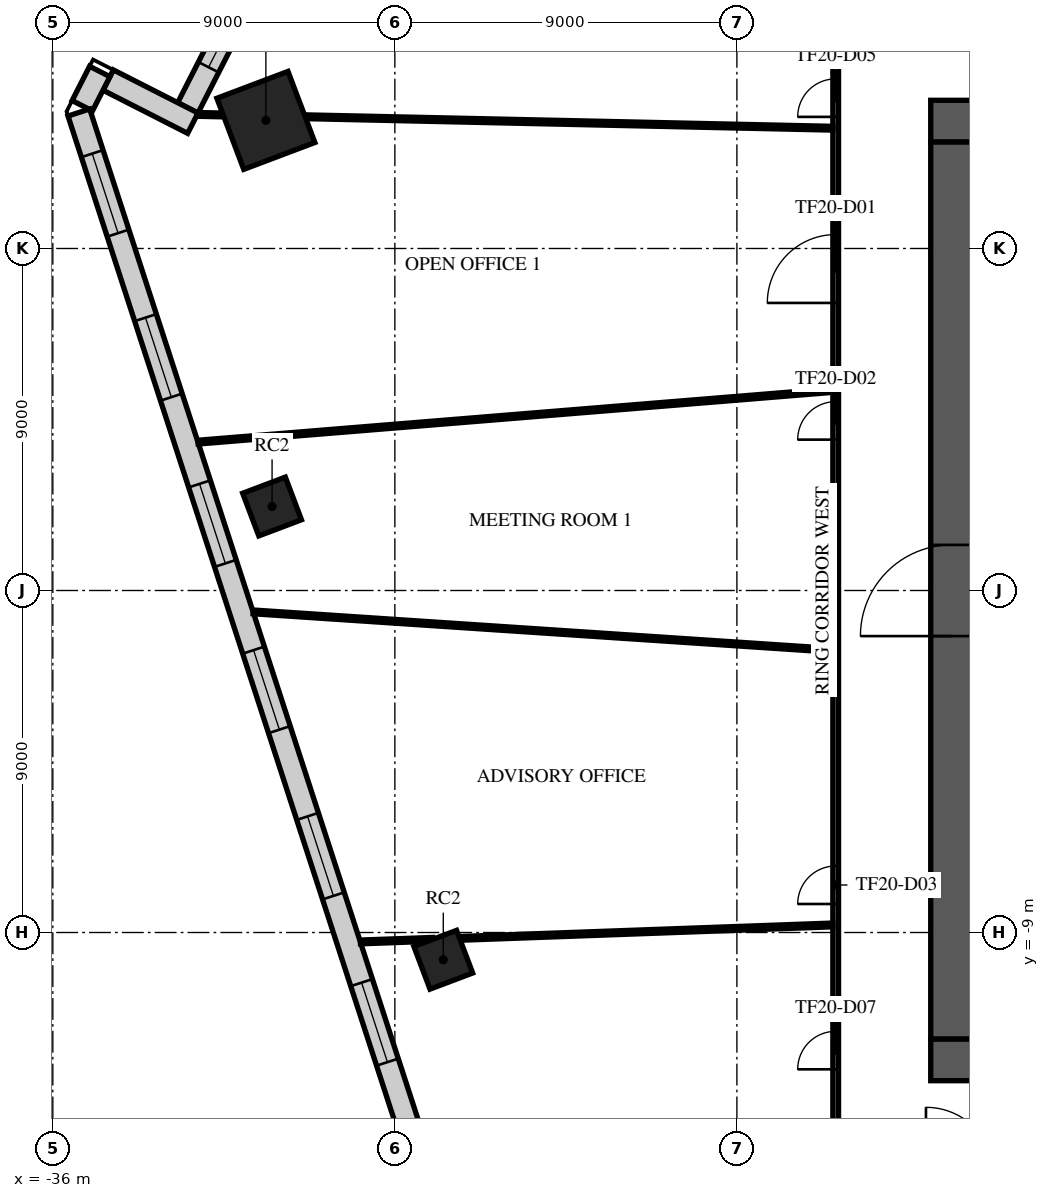
"""IFC4 building model, lengths in metres.
Left out: names, types, materials, properties, quantities, classifications, styles, units other than length and angle.
Written with IfcOpenShell. Run it as: python <this file> out.ifc"""

import sys

from ifc_helpers import new_model, si_unit, direction, frame, frame_2d, origin, origin_2d, place, context, subcontext, project, spatial, rectangle, extrude, element, fill, save


model = new_model("IFC4")
c1 = context("Model", 3, precision=1e-05, world=origin(), true_north=direction((0.0, 1.0)))
c2 = subcontext(c1, "Body", "Model", "MODEL_VIEW")
j1 = project(units=[si_unit("LENGTHUNIT", "METRE"), si_unit("PLANEANGLEUNIT", "RADIAN")], contexts=[c1])
p1 = place(None, origin())
s1 = spatial("IfcSite", under=j1, at=p1, CompositionType="ELEMENT")
p2 = place(p1, origin())
s2 = spatial("IfcBuilding", under=s1, at=p2, CompositionType="ELEMENT")
p3 = place(p2, frame((0.0, 0.0, 90.1)))
s3 = spatial("IfcBuildingStorey", under=s2, at=p3, CompositionType="ELEMENT", Elevation=90.1)
p4 = place(p3, frame((-30.394, 12.371, 0.0), z_axis=(0.0, 0.0, 1.0), x_axis=(0.935491525991, 0.353349125935, 0.0)))
e1 = element("IfcColumn", 1, at=p4, inside=s3, PredefinedType="COLUMN", context=c2, shape_type="SweptSolid", body=[
    extrude(rectangle(XDim=2.0, YDim=2.0, at=origin_2d()), origin(), (0.0, 0.0, 1.0), 4.0),
])
for number, where, z_axis, x_axis in (
    (2, (-30.231, 2.21, 0.0), (0.0, 0.0, 1.0), (0.935, 0.353, 0.0)),
    (3, (-25.726, -9.717, 0.0), (0.0, 0.0, 1.0), (0.935, 0.353, 0.0)),
):
    element("IfcColumn", number, at=place(p3, frame(where, z_axis=z_axis, x_axis=x_axis)), inside=s3, PredefinedType="COLUMN", context=c2, shape_type="SweptSolid", body=[
        extrude(rectangle(XDim=1.2, YDim=1.2, at=origin_2d()), origin(), (0.0, 0.0, 1.0), 4.0),
    ])
p5 = place(p3, frame((-12.9, 12.35, 0.0), z_axis=(0.0, 0.0, 1.0), x_axis=(1.0, 0.0, 0.0)))
e4 = element("IfcWall", 4, at=p5, inside=s3, PredefinedType="SHEAR", context=c2, shape_type="SweptSolid", body=[
    extrude(rectangle(XDim=25.8, YDim=1.1, at=frame_2d((12.9, 0.0))), origin(), (0.0, 0.0, 1.0), 3.58),
])
p6 = place(p5, frame((11.7, 0.0, 0.0)))
e5 = element("IfcOpeningElement", 5, at=p6, cuts=e4, PredefinedType="OPENING", context=c2, shape_type="SweptSolid", body=[
    extrude(rectangle(XDim=2.4, YDim=2.4, at=frame_2d((1.2, 1.2))), frame((0.0, 0.56, 0.0), z_axis=(0.0, -1.0, 0.0), x_axis=(1.0, 0.0, 0.0)), (0.0, 0.0, 1.0), 1.12),
])
p7 = place(p5, frame((22.525, 0.0, 0.0)))
e6 = element("IfcOpeningElement", 6, at=p7, cuts=e4, PredefinedType="OPENING", context=c2, shape_type="SweptSolid", body=[
    extrude(rectangle(XDim=1.2, YDim=2.1, at=frame_2d((0.6, 1.05))), frame((0.0, 0.56, 0.0), z_axis=(0.0, -1.0, 0.0), x_axis=(1.0, 0.0, 0.0)), (0.0, 0.0, 1.0), 1.12),
])
p8 = place(p5, frame((1.5, 0.0, 0.0)))
e7 = element("IfcOpeningElement", 7, at=p8, cuts=e4, PredefinedType="OPENING", context=c2, shape_type="SweptSolid", body=[
    extrude(rectangle(XDim=1.0, YDim=2.1, at=frame_2d((0.5, 1.05))), frame((0.0, 0.56, 0.0), z_axis=(0.0, -1.0, 0.0), x_axis=(1.0, 0.0, 0.0)), (0.0, 0.0, 1.0), 1.12),
])
p9 = place(p3, frame((-12.9, -12.35, 0.0), z_axis=(0.0, 0.0, 1.0), x_axis=(1.0, 0.0, 0.0)))
e8 = element("IfcWall", 8, at=p9, inside=s3, PredefinedType="SHEAR", context=c2, shape_type="SweptSolid", body=[
    extrude(rectangle(XDim=25.8, YDim=1.1, at=frame_2d((12.9, 0.0))), origin(), (0.0, 0.0, 1.0), 3.58),
])
p10 = place(p9, frame((7.8, 0.0, 0.0)))
e9 = element("IfcOpeningElement", 9, at=p10, cuts=e8, PredefinedType="OPENING", context=c2, shape_type="SweptSolid", body=[
    extrude(rectangle(XDim=2.0, YDim=2.1, at=frame_2d((1.0, 1.05))), frame((0.0, 0.56, 0.0), z_axis=(0.0, -1.0, 0.0), x_axis=(1.0, 0.0, 0.0)), (0.0, 0.0, 1.0), 1.12),
])
p11 = place(p9, frame((17.925, 0.0, 0.0)))
e10 = element("IfcOpeningElement", 10, at=p11, cuts=e8, PredefinedType="OPENING", context=c2, shape_type="SweptSolid", body=[
    extrude(rectangle(XDim=1.2, YDim=2.1, at=frame_2d((0.6, 1.05))), frame((0.0, 0.56, 0.0), z_axis=(0.0, -1.0, 0.0), x_axis=(1.0, 0.0, 0.0)), (0.0, 0.0, 1.0), 1.12),
])
p12 = place(p9, frame((2.075, 0.0, 0.0)))
e11 = element("IfcOpeningElement", 11, at=p12, cuts=e8, PredefinedType="OPENING", context=c2, shape_type="SweptSolid", body=[
    extrude(rectangle(XDim=1.2, YDim=2.1, at=frame_2d((0.6, 1.05))), frame((0.0, 0.56, 0.0), z_axis=(0.0, -1.0, 0.0), x_axis=(1.0, 0.0, 0.0)), (0.0, 0.0, 1.0), 1.12),
])
p13 = place(p9, frame((22.525, 0.0, 0.0)))
e12 = element("IfcOpeningElement", 12, at=p13, cuts=e8, PredefinedType="OPENING", context=c2, shape_type="SweptSolid", body=[
    extrude(rectangle(XDim=1.2, YDim=2.1, at=frame_2d((0.6, 1.05))), frame((0.0, 0.56, 0.0), z_axis=(0.0, -1.0, 0.0), x_axis=(1.0, 0.0, 0.0)), (0.0, 0.0, 1.0), 1.12),
])
p14 = place(p3, frame((-12.35, -11.8, 0.0), z_axis=(0.0, 0.0, 1.0), x_axis=(0.0, 1.0, 0.0)))
e13 = element("IfcWall", 13, at=p14, inside=s3, PredefinedType="SHEAR", context=c2, shape_type="SweptSolid", body=[
    extrude(rectangle(XDim=23.6, YDim=1.1, at=frame_2d((11.8, 0.0))), origin(), (0.0, 0.0, 1.0), 3.58),
])
p15 = place(p14, frame((10.6, 0.0, 0.0)))
e14 = element("IfcOpeningElement", 14, at=p15, cuts=e13, PredefinedType="OPENING", context=c2, shape_type="SweptSolid", body=[
    extrude(rectangle(XDim=2.4, YDim=2.4, at=frame_2d((1.2, 1.2))), frame((0.0, 0.56, 0.0), z_axis=(0.0, -1.0, 0.0), x_axis=(1.0, 0.0, 0.0)), (0.0, 0.0, 1.0), 1.12),
])
p16 = place(p3, frame((-30.631, 16.265, 0.0), z_axis=(0.0, 0.0, 1.0), x_axis=(-0.454011719911, -0.890995711653, 0.0)))
e15 = element("IfcWall", 15, at=p16, inside=s3, PredefinedType="STANDARD", context=c2, shape_type="SweptSolid", body=[
    extrude(rectangle(XDim=4.0, YDim=0.6, at=frame_2d((2.0, 0.0))), origin(), (0.0, 0.0, 1.0), 3.58),
])
p17 = place(p16, frame((1.2, 0.0, 0.9)))
e16 = element("IfcOpeningElement", 16, at=p17, cuts=e15, PredefinedType="OPENING", context=c2, shape_type="SweptSolid", body=[
    extrude(rectangle(XDim=1.6, YDim=2.1, at=frame_2d((0.8, 1.05))), frame((0.0, 0.31, 0.0), z_axis=(0.0, -1.0, 0.0), x_axis=(1.0, 0.0, 0.0)), (0.0, 0.0, 1.0), 0.62),
])
p18 = place(p3, frame((-32.316, 12.297, 0.0), z_axis=(0.0, 0.0, 1.0), x_axis=(-0.891023102287, 0.453957961921, 0.0)))
e17 = element("IfcWall", 17, at=p18, inside=s3, PredefinedType="STANDARD", context=c2, shape_type="SweptSolid", body=[
    extrude(rectangle(XDim=2.5, YDim=0.6, at=frame_2d((1.25, 0.0))), origin(), (0.0, 0.0, 1.0), 3.58),
])
p19 = place(p3, frame((-34.765, 13.658, 0.0), z_axis=(0.0, 0.0, 1.0), x_axis=(-0.454055955632, -0.890973169717, 0.0)))
e18 = element("IfcWall", 18, at=p19, inside=s3, PredefinedType="STANDARD", context=c2, shape_type="SweptSolid", body=[
    extrude(rectangle(XDim=1.011, YDim=0.6, at=frame_2d((0.506, 0.0))), origin(), (0.0, 0.0, 1.0), 3.58),
])
p20 = place(p3, frame((-35.315, 12.578, 0.0), z_axis=(0.0, 0.0, 1.0), x_axis=(0.309016329352, -0.951056732374, 0.0)))
e19 = element("IfcWall", 19, at=p20, inside=s3, PredefinedType="STANDARD", context=c2, shape_type="SweptSolid", body=[
    extrude(rectangle(XDim=45.751, YDim=0.6, at=frame_2d((22.876, 0.0))), origin(), (0.0, 0.0, 1.0), 3.58),
])
p21 = place(p20, frame((1.138, 0.0, 0.9)))
e20 = element("IfcOpeningElement", 20, at=p21, cuts=e19, PredefinedType="OPENING", context=c2, shape_type="SweptSolid", body=[
    extrude(rectangle(XDim=2.2, YDim=2.1, at=frame_2d((1.1, 1.05))), frame((0.0, 0.31, 0.0), z_axis=(0.0, -1.0, 0.0), x_axis=(1.0, 0.0, 0.0)), (0.0, 0.0, 1.0), 0.62),
])
p22 = place(p20, frame((5.676, 0.0, 0.9)))
e21 = element("IfcOpeningElement", 21, at=p22, cuts=e19, PredefinedType="OPENING", context=c2, shape_type="SweptSolid", body=[
    extrude(rectangle(XDim=2.2, YDim=2.1, at=frame_2d((1.1, 1.05))), frame((0.0, 0.31, 0.0), z_axis=(0.0, -1.0, 0.0), x_axis=(1.0, 0.0, 0.0)), (0.0, 0.0, 1.0), 0.62),
])
p23 = place(p20, frame((10.276, 0.0, 0.9)))
e22 = element("IfcOpeningElement", 22, at=p23, cuts=e19, PredefinedType="OPENING", context=c2, shape_type="SweptSolid", body=[
    extrude(rectangle(XDim=2.2, YDim=2.1, at=frame_2d((1.1, 1.05))), frame((0.0, 0.31, 0.0), z_axis=(0.0, -1.0, 0.0), x_axis=(1.0, 0.0, 0.0)), (0.0, 0.0, 1.0), 0.62),
])
p24 = place(p20, frame((14.876, 0.0, 0.9)))
e23 = element("IfcOpeningElement", 23, at=p24, cuts=e19, PredefinedType="OPENING", context=c2, shape_type="SweptSolid", body=[
    extrude(rectangle(XDim=2.2, YDim=2.1, at=frame_2d((1.1, 1.05))), frame((0.0, 0.31, 0.0), z_axis=(0.0, -1.0, 0.0), x_axis=(1.0, 0.0, 0.0)), (0.0, 0.0, 1.0), 0.62),
])
p25 = place(p20, frame((19.476, 0.0, 0.9)))
e24 = element("IfcOpeningElement", 24, at=p25, cuts=e19, PredefinedType="OPENING", context=c2, shape_type="SweptSolid", body=[
    extrude(rectangle(XDim=2.2, YDim=2.1, at=frame_2d((1.1, 1.05))), frame((0.0, 0.31, 0.0), z_axis=(0.0, -1.0, 0.0), x_axis=(1.0, 0.0, 0.0)), (0.0, 0.0, 1.0), 0.62),
])
p26 = place(p20, frame((24.076, 0.0, 0.9)))
e25 = element("IfcOpeningElement", 25, at=p26, cuts=e19, PredefinedType="OPENING", context=c2, shape_type="SweptSolid", body=[
    extrude(rectangle(XDim=2.2, YDim=2.1, at=frame_2d((1.1, 1.05))), frame((0.0, 0.31, 0.0), z_axis=(0.0, -1.0, 0.0), x_axis=(1.0, 0.0, 0.0)), (0.0, 0.0, 1.0), 0.62),
])
p27 = place(p20, frame((28.676, 0.0, 0.9)))
e26 = element("IfcOpeningElement", 26, at=p27, cuts=e19, PredefinedType="OPENING", context=c2, shape_type="SweptSolid", body=[
    extrude(rectangle(XDim=2.2, YDim=2.1, at=frame_2d((1.1, 1.05))), frame((0.0, 0.31, 0.0), z_axis=(0.0, -1.0, 0.0), x_axis=(1.0, 0.0, 0.0)), (0.0, 0.0, 1.0), 0.62),
])
p28 = place(p20, frame((33.276, 0.0, 0.9)))
e27 = element("IfcOpeningElement", 27, at=p28, cuts=e19, PredefinedType="OPENING", context=c2, shape_type="SweptSolid", body=[
    extrude(rectangle(XDim=2.2, YDim=2.1, at=frame_2d((1.1, 1.05))), frame((0.0, 0.31, 0.0), z_axis=(0.0, -1.0, 0.0), x_axis=(1.0, 0.0, 0.0)), (0.0, 0.0, 1.0), 0.62),
])
p29 = place(p20, frame((37.876, 0.0, 0.9)))
e28 = element("IfcOpeningElement", 28, at=p29, cuts=e19, PredefinedType="OPENING", context=c2, shape_type="SweptSolid", body=[
    extrude(rectangle(XDim=2.2, YDim=2.1, at=frame_2d((1.1, 1.05))), frame((0.0, 0.31, 0.0), z_axis=(0.0, -1.0, 0.0), x_axis=(1.0, 0.0, 0.0)), (0.0, 0.0, 1.0), 0.62),
])
p30 = place(p20, frame((42.414, 0.0, 0.9)))
e29 = element("IfcOpeningElement", 29, at=p30, cuts=e19, PredefinedType="OPENING", context=c2, shape_type="SweptSolid", body=[
    extrude(rectangle(XDim=2.2, YDim=2.1, at=frame_2d((1.1, 1.05))), frame((0.0, 0.31, 0.0), z_axis=(0.0, -1.0, 0.0), x_axis=(1.0, 0.0, 0.0)), (0.0, 0.0, 1.0), 0.62),
])
p31 = place(p3, frame((-15.4, -15.4, 0.0), z_axis=(0.0, 0.0, 1.0), x_axis=(0.0, 1.0, 0.0)))
e30 = element("IfcWall", 30, at=p31, inside=s3, PredefinedType="PARTITIONING", context=c2, shape_type="SweptSolid", body=[
    extrude(rectangle(XDim=30.8, YDim=0.15, at=frame_2d((15.4, 0.0))), origin(), (0.0, 0.0, 1.0), 3.08),
])
p32 = place(p31, frame((22.967, 0.0, 0.0)))
e31 = element("IfcOpeningElement", 31, at=p32, cuts=e30, PredefinedType="OPENING", context=c2, shape_type="SweptSolid", body=[
    extrude(rectangle(XDim=1.8, YDim=2.1, at=frame_2d((0.9, 1.05))), frame((0.0, 0.085, 0.0), z_axis=(0.0, -1.0, 0.0), x_axis=(1.0, 0.0, 0.0)), (0.0, 0.0, 1.0), 0.17),
])
p33 = place(p31, frame((19.37, 0.0, 0.0)))
e32 = element("IfcOpeningElement", 32, at=p33, cuts=e30, PredefinedType="OPENING", context=c2, shape_type="SweptSolid", body=[
    extrude(rectangle(XDim=1.0, YDim=2.1, at=frame_2d((0.5, 1.05))), frame((0.0, 0.085, 0.0), z_axis=(0.0, -1.0, 0.0), x_axis=(1.0, 0.0, 0.0)), (0.0, 0.0, 1.0), 0.17),
])
p34 = place(p31, frame((7.15, 0.0, 0.0)))
e33 = element("IfcOpeningElement", 33, at=p34, cuts=e30, PredefinedType="OPENING", context=c2, shape_type="SweptSolid", body=[
    extrude(rectangle(XDim=1.0, YDim=2.1, at=frame_2d((0.5, 1.05))), frame((0.0, 0.085, 0.0), z_axis=(0.0, -1.0, 0.0), x_axis=(1.0, 0.0, 0.0)), (0.0, 0.0, 1.0), 0.17),
])
p35 = place(p31, frame((27.863, 0.0, 0.0)))
e34 = element("IfcOpeningElement", 34, at=p35, cuts=e30, PredefinedType="OPENING", context=c2, shape_type="SweptSolid", body=[
    extrude(rectangle(XDim=1.0, YDim=2.1, at=frame_2d((0.5, 1.05))), frame((0.0, 0.085, 0.0), z_axis=(0.0, -1.0, 0.0), x_axis=(1.0, 0.0, 0.0)), (0.0, 0.0, 1.0), 0.17),
])
p36 = place(p31, frame((2.8, 0.0, 0.0)))
e35 = element("IfcOpeningElement", 35, at=p36, cuts=e30, PredefinedType="OPENING", context=c2, shape_type="SweptSolid", body=[
    extrude(rectangle(XDim=1.0, YDim=2.1, at=frame_2d((0.5, 1.05))), frame((0.0, 0.085, 0.0), z_axis=(0.0, -1.0, 0.0), x_axis=(1.0, 0.0, 0.0)), (0.0, 0.0, 1.0), 0.17),
])
p37 = place(p3, frame((-32.196, 12.529, 0.0), z_axis=(0.0, 0.0, 1.0), x_axis=(0.999759697185, -0.021921402419, 0.0)))
e36 = element("IfcWall", 36, at=p37, inside=s3, PredefinedType="PARTITIONING", context=c2, shape_type="SweptSolid", body=[
    extrude(rectangle(XDim=0.679, YDim=0.1, at=frame_2d((0.34, 0.0))), origin(), (0.0, 0.0, 1.0), 3.58),
])
p38 = place(p3, frame((-32.179, 3.904, 0.0), z_axis=(0.0, 0.0, 1.0), x_axis=(0.996703590135, 0.081129238943, 0.0)))
e37 = element("IfcWall", 37, at=p38, inside=s3, PredefinedType="PARTITIONING", context=c2, shape_type="SweptSolid", body=[
    extrude(rectangle(XDim=16.756, YDim=0.1, at=frame_2d((8.378, 0.0))), origin(), (0.0, 0.0, 1.0), 2.83),
])
p39 = place(p3, frame((-30.728, -0.563, 0.0), z_axis=(0.0, 0.0, 1.0), x_axis=(0.997806523093, -0.066197752777, 0.0)))
e38 = element("IfcWall", 38, at=p39, inside=s3, PredefinedType="PARTITIONING", context=c2, shape_type="SweptSolid", body=[
    extrude(rectangle(XDim=15.283, YDim=0.1, at=frame_2d((7.642, 0.0))), origin(), (0.0, 0.0, 1.0), 2.83),
])
p40 = place(p3, frame((-29.361, 12.467, 0.0), z_axis=(0.0, 0.0, 1.0), x_axis=(0.999763547956, -0.021745072509, 0.0)))
e39 = element("IfcWall", 39, at=p40, inside=s3, PredefinedType="PARTITIONING", context=c2, shape_type="SweptSolid", body=[
    extrude(rectangle(XDim=13.888, YDim=0.1, at=frame_2d((6.944, 0.0))), origin(), (0.0, 0.0, 1.0), 2.96),
])
p41 = place(p3, frame((-27.906, -9.248, 0.0), z_axis=(0.0, 0.0, 1.0), x_axis=(0.999356144168, 0.035878922986, 0.0)))
e40 = element("IfcWall", 40, at=p41, inside=s3, PredefinedType="PARTITIONING", context=c2, shape_type="SweptSolid", body=[
    extrude(rectangle(XDim=1.905, YDim=0.1, at=frame_2d((0.953, 0.0))), origin(), (0.0, 0.0, 1.0), 2.83),
])
p42 = place(p3, frame((-25.297, -9.155, 0.0), z_axis=(0.0, 0.0, 1.0), x_axis=(0.999351792824, 0.035999919148, 0.0)))
e41 = element("IfcWall", 41, at=p42, inside=s3, PredefinedType="PARTITIONING", context=c2, shape_type="SweptSolid", body=[
    extrude(rectangle(XDim=9.827, YDim=0.1, at=frame_2d((4.913, 0.0))), origin(), (0.0, 0.0, 1.0), 2.96),
])
p43 = place(p15, origin())
e42 = element("IfcDoor", 42, at=p43, inside=s3, OperationType="SINGLE_SWING_LEFT", PredefinedType="DOOR", context=c2, shape_type="SweptSolid", body=[
    extrude(rectangle(XDim=2.4, YDim=2.4, at=frame_2d((1.2, 1.2))), frame((0.0, 0.025, 0.0), z_axis=(0.0, -1.0, 0.0), x_axis=(1.0, 0.0, 0.0)), (0.0, 0.0, 1.0), 0.05),
])
fill(e14, e42)
p44 = place(p17, origin())
e43 = element("IfcWindow", 43, at=p44, inside=s3, PartitioningType="SINGLE_PANEL", PredefinedType="WINDOW", context=c2, shape_type="SweptSolid", body=[
    extrude(rectangle(XDim=1.6, YDim=2.1, at=frame_2d((0.8, 1.05))), frame((0.0, 0.03, 0.0), z_axis=(0.0, -1.0, 0.0), x_axis=(1.0, 0.0, 0.0)), (0.0, 0.0, 1.0), 0.06),
])
fill(e16, e43)
p45 = place(p21, origin())
e44 = element("IfcWindow", 44, at=p45, inside=s3, PartitioningType="SINGLE_PANEL", PredefinedType="WINDOW", context=c2, shape_type="SweptSolid", body=[
    extrude(rectangle(XDim=2.2, YDim=2.1, at=frame_2d((1.1, 1.05))), frame((0.0, 0.03, 0.0), z_axis=(0.0, -1.0, 0.0), x_axis=(1.0, 0.0, 0.0)), (0.0, 0.0, 1.0), 0.06),
])
fill(e20, e44)
p46 = place(p22, origin())
e45 = element("IfcWindow", 45, at=p46, inside=s3, PartitioningType="SINGLE_PANEL", PredefinedType="WINDOW", context=c2, shape_type="SweptSolid", body=[
    extrude(rectangle(XDim=2.2, YDim=2.1, at=frame_2d((1.1, 1.05))), frame((0.0, 0.03, 0.0), z_axis=(0.0, -1.0, 0.0), x_axis=(1.0, 0.0, 0.0)), (0.0, 0.0, 1.0), 0.06),
])
fill(e21, e45)
p47 = place(p23, origin())
e46 = element("IfcWindow", 46, at=p47, inside=s3, PartitioningType="SINGLE_PANEL", PredefinedType="WINDOW", context=c2, shape_type="SweptSolid", body=[
    extrude(rectangle(XDim=2.2, YDim=2.1, at=frame_2d((1.1, 1.05))), frame((0.0, 0.03, 0.0), z_axis=(0.0, -1.0, 0.0), x_axis=(1.0, 0.0, 0.0)), (0.0, 0.0, 1.0), 0.06),
])
fill(e22, e46)
p48 = place(p24, origin())
e47 = element("IfcWindow", 47, at=p48, inside=s3, PartitioningType="SINGLE_PANEL", PredefinedType="WINDOW", context=c2, shape_type="SweptSolid", body=[
    extrude(rectangle(XDim=2.2, YDim=2.1, at=frame_2d((1.1, 1.05))), frame((0.0, 0.03, 0.0), z_axis=(0.0, -1.0, 0.0), x_axis=(1.0, 0.0, 0.0)), (0.0, 0.0, 1.0), 0.06),
])
fill(e23, e47)
p49 = place(p25, origin())
e48 = element("IfcWindow", 48, at=p49, inside=s3, PartitioningType="SINGLE_PANEL", PredefinedType="WINDOW", context=c2, shape_type="SweptSolid", body=[
    extrude(rectangle(XDim=2.2, YDim=2.1, at=frame_2d((1.1, 1.05))), frame((0.0, 0.03, 0.0), z_axis=(0.0, -1.0, 0.0), x_axis=(1.0, 0.0, 0.0)), (0.0, 0.0, 1.0), 0.06),
])
fill(e24, e48)
p50 = place(p26, origin())
e49 = element("IfcWindow", 49, at=p50, inside=s3, PartitioningType="SINGLE_PANEL", PredefinedType="WINDOW", context=c2, shape_type="SweptSolid", body=[
    extrude(rectangle(XDim=2.2, YDim=2.1, at=frame_2d((1.1, 1.05))), frame((0.0, 0.03, 0.0), z_axis=(0.0, -1.0, 0.0), x_axis=(1.0, 0.0, 0.0)), (0.0, 0.0, 1.0), 0.06),
])
fill(e25, e49)
p51 = place(p32, origin())
e50 = element("IfcDoor", 50, at=p51, inside=s3, OperationType="DOUBLE_DOOR_SINGLE_SWING", PredefinedType="DOOR", context=c2, shape_type="SweptSolid", body=[
    extrude(rectangle(XDim=1.8, YDim=2.1, at=frame_2d((0.9, 1.05))), frame((0.0, 0.025, 0.0), z_axis=(0.0, -1.0, 0.0), x_axis=(1.0, 0.0, 0.0)), (0.0, 0.0, 1.0), 0.05),
])
fill(e31, e50)
p52 = place(p33, origin())
e51 = element("IfcDoor", 51, at=p52, inside=s3, OperationType="SINGLE_SWING_RIGHT", PredefinedType="DOOR", context=c2, shape_type="SweptSolid", body=[
    extrude(rectangle(XDim=1.0, YDim=2.1, at=frame_2d((0.5, 1.05))), frame((0.0, 0.025, 0.0), z_axis=(0.0, -1.0, 0.0), x_axis=(1.0, 0.0, 0.0)), (0.0, 0.0, 1.0), 0.05),
])
fill(e32, e51)
p53 = place(p34, origin())
e52 = element("IfcDoor", 52, at=p53, inside=s3, OperationType="SINGLE_SWING_LEFT", PredefinedType="DOOR", context=c2, shape_type="SweptSolid", body=[
    extrude(rectangle(XDim=1.0, YDim=2.1, at=frame_2d((0.5, 1.05))), frame((0.0, 0.025, 0.0), z_axis=(0.0, -1.0, 0.0), x_axis=(1.0, 0.0, 0.0)), (0.0, 0.0, 1.0), 0.05),
])
fill(e33, e52)
p54 = place(p35, origin())
e53 = element("IfcDoor", 53, at=p54, inside=s3, OperationType="SINGLE_SWING_RIGHT", PredefinedType="DOOR", context=c2, shape_type="SweptSolid", body=[
    extrude(rectangle(XDim=1.0, YDim=2.1, at=frame_2d((0.5, 1.05))), frame((0.0, 0.025, 0.0), z_axis=(0.0, -1.0, 0.0), x_axis=(1.0, 0.0, 0.0)), (0.0, 0.0, 1.0), 0.05),
])
fill(e34, e53)
p55 = place(p36, origin())
e54 = element("IfcDoor", 54, at=p55, inside=s3, OperationType="SINGLE_SWING_RIGHT", PredefinedType="DOOR", context=c2, shape_type="SweptSolid", body=[
    extrude(rectangle(XDim=1.0, YDim=2.1, at=frame_2d((0.5, 1.05))), frame((0.0, 0.025, 0.0), z_axis=(0.0, -1.0, 0.0), x_axis=(1.0, 0.0, 0.0)), (0.0, 0.0, 1.0), 0.05),
])
fill(e35, e54)
save(model, sys.argv[1])
